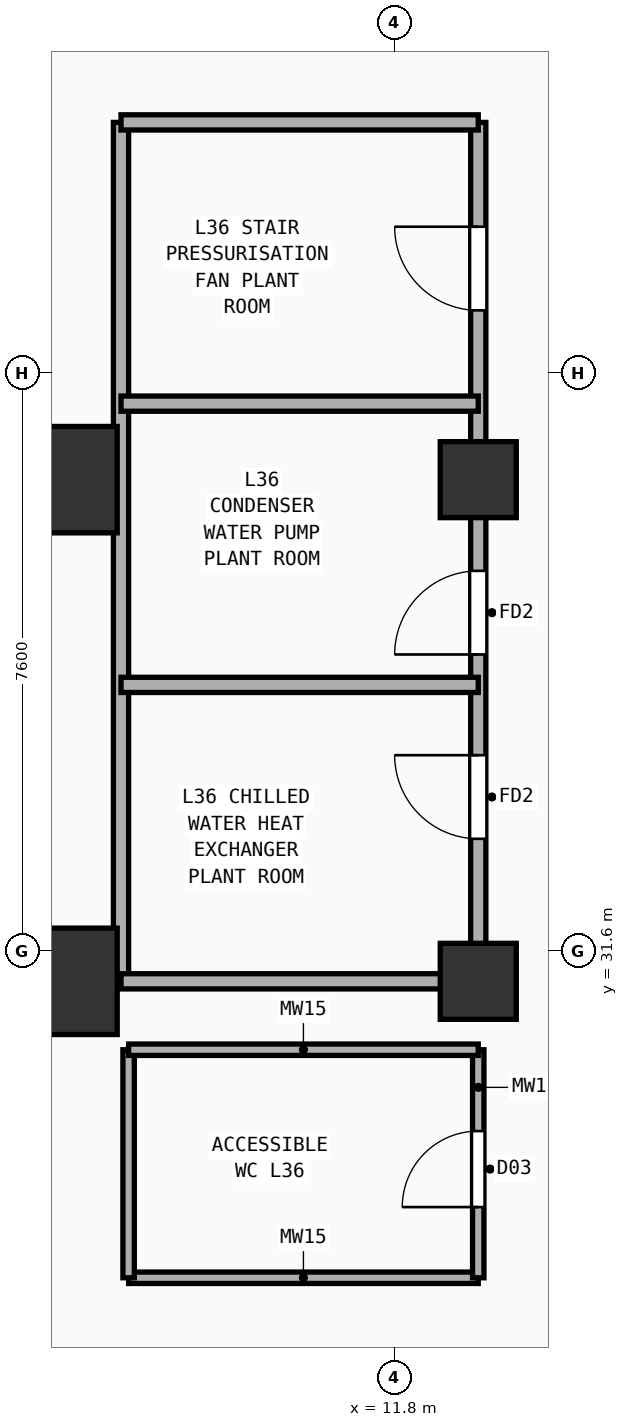
"""IFC4 building model, lengths in metres.
Left out: names, types, materials, properties, quantities, classifications, styles, units other than length and angle.
Written with IfcOpenShell. Run it as: python <this file> out.ifc"""

import sys

from ifc_helpers import new_model, si_unit, direction, frame, frame_2d, origin, origin_2d, place, context, subcontext, project, spatial, rectangle, extrude, element, fill, save


model = new_model("IFC4")
c1 = context("Model", 3, precision=1e-05, world=origin(), true_north=direction((0.0, 1.0)))
c2 = subcontext(c1, "Body", "Model", "MODEL_VIEW")
j1 = project(units=[si_unit("LENGTHUNIT", "METRE"), si_unit("PLANEANGLEUNIT", "RADIAN")], contexts=[c1])
p1 = place(None, origin())
s1 = spatial("IfcSite", under=j1, at=p1, CompositionType="ELEMENT")
p2 = place(p1, origin())
s2 = spatial("IfcBuilding", under=s1, at=p2, CompositionType="ELEMENT")
p3 = place(p2, frame((0.0, 0.0, 141.1)))
s3 = spatial("IfcBuildingStorey", under=s2, at=p3, CompositionType="ELEMENT", Elevation=141.1)
for number, where, z_axis, x_axis in (
    (1, (7.45, 31.2, 0.0), (0.0, 0.0, 1.0), (1.0, 0.0, 0.0)),
    (2, (7.45, 37.8, 0.0), (0.0, 0.0, 1.0), (1.0, 0.0, 0.0)),
):
    element("IfcColumn", number, at=place(p3, frame(where, z_axis=z_axis, x_axis=x_axis)), inside=s3, PredefinedType="COLUMN", context=c2, shape_type="SweptSolid", body=[
        extrude(rectangle(XDim=1.4, YDim=1.4, at=origin_2d()), origin(), (0.0, 0.0, 1.0), 4.86),
    ])
for number, where, z_axis, x_axis in (
    (3, (12.9, 31.2, 0.0), (0.0, 0.0, 1.0), (1.0, 0.0, 0.0)),
    (4, (12.9, 37.8, 0.0), (0.0, 0.0, 1.0), (1.0, 0.0, 0.0)),
):
    element("IfcColumn", number, at=place(p3, frame(where, z_axis=z_axis, x_axis=x_axis)), inside=s3, PredefinedType="COLUMN", context=c2, shape_type="SweptSolid", body=[
        extrude(rectangle(XDim=1.0, YDim=1.0, at=origin_2d()), origin(), (0.0, 0.0, 1.0), 4.86),
    ])
p4 = place(p3, frame((8.3, 27.3, 0.0), z_axis=(0.0, 0.0, 1.0), x_axis=(1.0, 0.0, 0.0)))
e5 = element("IfcWall", 5, at=p4, inside=s3, PredefinedType="PLUMBINGWALL", context=c2, shape_type="SweptSolid", body=[
    extrude(rectangle(XDim=4.6, YDim=0.15, at=frame_2d((2.3, 0.0))), origin(), (0.0, 0.0, 1.0), 4.86),
])
p5 = place(p3, frame((8.3, 27.3, 0.0), z_axis=(0.0, 0.0, 1.0), x_axis=(0.0, 1.0, 0.0)))
e6 = element("IfcWall", 6, at=p5, inside=s3, PredefinedType="PLUMBINGWALL", context=c2, shape_type="SweptSolid", body=[
    extrude(rectangle(XDim=3.0, YDim=0.15, at=frame_2d((1.5, 0.0))), origin(), (0.0, 0.0, 1.0), 4.86),
])
p6 = place(p3, frame((12.9, 27.3, 0.0), z_axis=(0.0, 0.0, 1.0), x_axis=(0.0, 1.0, 0.0)))
e7 = element("IfcWall", 7, at=p6, inside=s3, PredefinedType="PLUMBINGWALL", context=c2, shape_type="SweptSolid", body=[
    extrude(rectangle(XDim=3.0, YDim=0.15, at=frame_2d((1.5, 0.0))), origin(), (0.0, 0.0, 1.0), 3.96),
])
p7 = place(p6, frame((0.93, 0.0, 0.0)))
e8 = element("IfcOpeningElement", 8, at=p7, cuts=e7, PredefinedType="OPENING", context=c2, shape_type="SweptSolid", body=[
    extrude(rectangle(XDim=1.0, YDim=2.2, at=frame_2d((0.5, 1.1))), frame((0.0, 0.085, 0.0), z_axis=(0.0, -1.0, 0.0), x_axis=(1.0, 0.0, 0.0)), (0.0, 0.0, 1.0), 0.17),
])
p8 = place(p3, frame((8.3, 30.3, 0.0), z_axis=(0.0, 0.0, 1.0), x_axis=(1.0, 0.0, 0.0)))
e9 = element("IfcWall", 9, at=p8, inside=s3, PredefinedType="PLUMBINGWALL", context=c2, shape_type="SweptSolid", body=[
    extrude(rectangle(XDim=4.6, YDim=0.15, at=frame_2d((2.3, 0.0))), origin(), (0.0, 0.0, 1.0), 4.86),
])
p9 = place(p3, frame((12.9, 31.2, 0.0), z_axis=(0.0, 0.0, 1.0), x_axis=(0.0, 1.0, 0.0)))
e10 = element("IfcWall", 10, at=p9, inside=s3, PredefinedType="PARTITIONING", context=c2, shape_type="SweptSolid", body=[
    extrude(rectangle(XDim=11.3, YDim=0.2, at=frame_2d((5.65, 0.0))), origin(), (0.0, 0.0, 1.0), 3.96),
])
p10 = place(p9, frame((1.875, 0.0, 0.0)))
e11 = element("IfcOpeningElement", 11, at=p10, cuts=e10, PredefinedType="OPENING", context=c2, shape_type="SweptSolid", body=[
    extrude(rectangle(XDim=1.1, YDim=2.2, at=frame_2d((0.55, 1.1))), frame((0.0, 0.11, 0.0), z_axis=(0.0, -1.0, 0.0), x_axis=(1.0, 0.0, 0.0)), (0.0, 0.0, 1.0), 0.22),
])
p11 = place(p9, frame((4.3, 0.0, 0.0)))
e12 = element("IfcOpeningElement", 12, at=p11, cuts=e10, PredefinedType="OPENING", context=c2, shape_type="SweptSolid", body=[
    extrude(rectangle(XDim=1.1, YDim=2.2, at=frame_2d((0.55, 1.1))), frame((0.0, 0.11, 0.0), z_axis=(0.0, -1.0, 0.0), x_axis=(1.0, 0.0, 0.0)), (0.0, 0.0, 1.0), 0.22),
])
p12 = place(p9, frame((8.827, 0.0, 0.0)))
e13 = element("IfcOpeningElement", 13, at=p12, cuts=e10, PredefinedType="OPENING", context=c2, shape_type="SweptSolid", body=[
    extrude(rectangle(XDim=1.1, YDim=2.2, at=frame_2d((0.55, 1.1))), frame((0.0, 0.11, 0.0), z_axis=(0.0, -1.0, 0.0), x_axis=(1.0, 0.0, 0.0)), (0.0, 0.0, 1.0), 0.22),
])
p13 = place(p3, frame((8.2, 31.2, 0.0), z_axis=(0.0, 0.0, 1.0), x_axis=(0.0, 1.0, 0.0)))
e14 = element("IfcWall", 14, at=p13, inside=s3, PredefinedType="PARTITIONING", context=c2, shape_type="SweptSolid", body=[
    extrude(rectangle(XDim=11.3, YDim=0.2, at=frame_2d((5.65, 0.0))), origin(), (0.0, 0.0, 1.0), 4.86),
])
p14 = place(p3, frame((8.2, 31.2, 0.0), z_axis=(0.0, 0.0, 1.0), x_axis=(1.0, 0.0, 0.0)))
e15 = element("IfcWall", 15, at=p14, inside=s3, PredefinedType="PARTITIONING", context=c2, shape_type="SweptSolid", body=[
    extrude(rectangle(XDim=4.7, YDim=0.2, at=frame_2d((2.35, 0.0))), origin(), (0.0, 0.0, 1.0), 3.96),
])
p15 = place(p3, frame((8.2, 42.5, 0.0), z_axis=(0.0, 0.0, 1.0), x_axis=(1.0, 0.0, 0.0)))
e16 = element("IfcWall", 16, at=p15, inside=s3, PredefinedType="PARTITIONING", context=c2, shape_type="SweptSolid", body=[
    extrude(rectangle(XDim=4.7, YDim=0.2, at=frame_2d((2.35, 0.0))), origin(), (0.0, 0.0, 1.0), 4.46),
])
for number, where, z_axis, x_axis in (
    (17, (8.2, 35.1, 0.0), (0.0, 0.0, 1.0), (1.0, 0.0, 0.0)),
    (18, (8.2, 38.8, 0.0), (0.0, 0.0, 1.0), (1.0, 0.0, 0.0)),
):
    element("IfcWall", number, at=place(p3, frame(where, z_axis=z_axis, x_axis=x_axis)), inside=s3, PredefinedType="PARTITIONING", context=c2, shape_type="SweptSolid", body=[
        extrude(rectangle(XDim=4.7, YDim=0.2, at=frame_2d((2.35, 0.0))), origin(), (0.0, 0.0, 1.0), 4.86),
    ])
p16 = place(p7, origin())
e19 = element("IfcDoor", 19, at=p16, inside=s3, OperationType="SINGLE_SWING_LEFT", PredefinedType="DOOR", context=c2, shape_type="SweptSolid", body=[
    extrude(rectangle(XDim=1.0, YDim=2.2, at=frame_2d((0.5, 1.1))), frame((0.0, 0.025, 0.0), z_axis=(0.0, -1.0, 0.0), x_axis=(1.0, 0.0, 0.0)), (0.0, 0.0, 1.0), 0.05),
])
fill(e8, e19)
p17 = place(p10, origin())
e20 = element("IfcDoor", 20, at=p17, inside=s3, OperationType="SINGLE_SWING_RIGHT", PredefinedType="DOOR", context=c2, shape_type="SweptSolid", body=[
    extrude(rectangle(XDim=1.1, YDim=2.2, at=frame_2d((0.55, 1.1))), frame((0.0, 0.025, 0.0), z_axis=(0.0, -1.0, 0.0), x_axis=(1.0, 0.0, 0.0)), (0.0, 0.0, 1.0), 0.05),
])
fill(e11, e20)
p18 = place(p11, origin())
e21 = element("IfcDoor", 21, at=p18, inside=s3, OperationType="SINGLE_SWING_LEFT", PredefinedType="DOOR", context=c2, shape_type="SweptSolid", body=[
    extrude(rectangle(XDim=1.1, YDim=2.2, at=frame_2d((0.55, 1.1))), frame((0.0, 0.025, 0.0), z_axis=(0.0, -1.0, 0.0), x_axis=(1.0, 0.0, 0.0)), (0.0, 0.0, 1.0), 0.05),
])
fill(e12, e21)
p19 = place(p12, origin())
e22 = element("IfcDoor", 22, at=p19, inside=s3, OperationType="SINGLE_SWING_RIGHT", PredefinedType="DOOR", context=c2, shape_type="SweptSolid", body=[
    extrude(rectangle(XDim=1.1, YDim=2.2, at=frame_2d((0.55, 1.1))), frame((0.0, 0.025, 0.0), z_axis=(0.0, -1.0, 0.0), x_axis=(1.0, 0.0, 0.0)), (0.0, 0.0, 1.0), 0.05),
])
fill(e13, e22)
save(model, sys.argv[1])
